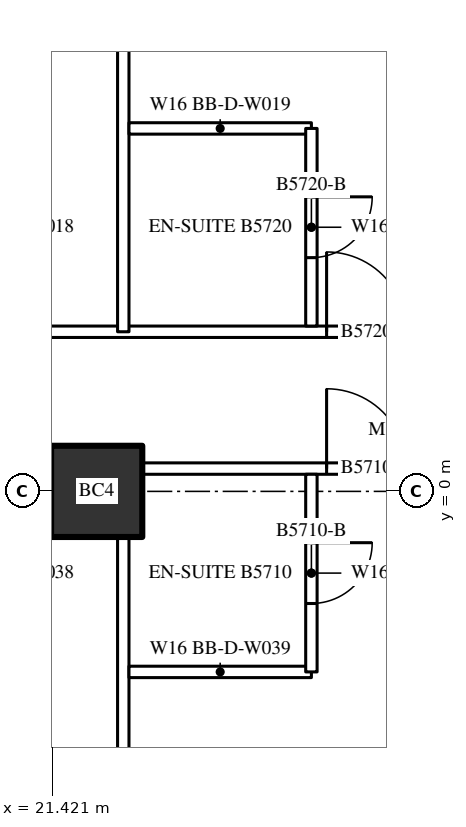
"""IFC4 building model, lengths in metres.
Left out: names, types, materials, properties, quantities, classifications, styles, units other than length and angle.
Written with IfcOpenShell. Run it as: python <this file> out.ifc"""

import sys

from ifc_helpers import new_model, si_unit, direction, frame, frame_2d, origin, origin_2d, place, context, subcontext, project, spatial, rectangle, hollow_rectangle, extrude, element, fill, save


model = new_model("IFC4")
c1 = context("Model", 3, precision=1e-05, world=origin(), true_north=direction((0.0, 1.0)))
c2 = subcontext(c1, "Body", "Model", "MODEL_VIEW")
j1 = project(units=[si_unit("LENGTHUNIT", "METRE"), si_unit("PLANEANGLEUNIT", "RADIAN")], contexts=[c1])
p1 = place(None, origin())
s1 = spatial("IfcSite", under=j1, at=p1, CompositionType="ELEMENT")
p2 = place(p1, origin())
s2 = spatial("IfcBuilding", under=s1, at=p2, CompositionType="ELEMENT")
p3 = place(p2, frame((0.0, 0.0, 215.3)))
s3 = spatial("IfcBuildingStorey", under=s2, at=p3, CompositionType="ELEMENT", Elevation=215.3)
p4 = place(p3, frame((22.0, 0.0, 0.0), z_axis=(0.0, 0.0, 1.0), x_axis=(1.0, 0.0, 0.0)))
e1 = element("IfcColumn", 1, at=p4, inside=s3, PredefinedType="COLUMN", context=c2, shape_type="SweptSolid", body=[
    extrude(hollow_rectangle(XDim=1.2, YDim=1.2, WallThickness=0.12, at=origin_2d()), origin(), (0.0, 0.0, 1.0), 3.6),
])
p5 = place(p3, frame((-27.5, 0.3, 0.0), z_axis=(0.0, 0.0, 1.0), x_axis=(1.0, 0.0, 0.0)))
e2 = element("IfcWall", 2, at=p5, inside=s3, PredefinedType="PARTITIONING", context=c2, shape_type="SweptSolid", body=[
    extrude(rectangle(XDim=55.0, YDim=0.15, at=frame_2d((27.5, 0.0))), origin(), (0.0, 0.0, 1.0), 2.4),
])
p6 = place(p5, frame((1.575, 0.0, 0.0)))
e3 = element("IfcOpeningElement", 3, at=p6, cuts=e2, PredefinedType="OPENING", context=c2, shape_type="SweptSolid", body=[
    extrude(rectangle(XDim=1.0, YDim=2.2, at=frame_2d((0.5, 1.1))), frame((0.0, 0.085, 0.0), z_axis=(0.0, -1.0, 0.0), x_axis=(1.0, 0.0, 0.0)), (0.0, 0.0, 1.0), 0.17),
])
p7 = place(p5, frame((8.525, 0.0, 0.0)))
e4 = element("IfcOpeningElement", 4, at=p7, cuts=e2, PredefinedType="OPENING", context=c2, shape_type="SweptSolid", body=[
    extrude(rectangle(XDim=1.05, YDim=2.4, at=frame_2d((0.525, 1.2))), frame((0.0, 0.085, 0.0), z_axis=(0.0, -1.0, 0.0), x_axis=(1.0, 0.0, 0.0)), (0.0, 0.0, 1.0), 0.17),
])
p8 = place(p5, frame((14.025, 0.0, 0.0)))
e5 = element("IfcOpeningElement", 5, at=p8, cuts=e2, PredefinedType="OPENING", context=c2, shape_type="SweptSolid", body=[
    extrude(rectangle(XDim=1.05, YDim=2.4, at=frame_2d((0.525, 1.2))), frame((0.0, 0.085, 0.0), z_axis=(0.0, -1.0, 0.0), x_axis=(1.0, 0.0, 0.0)), (0.0, 0.0, 1.0), 0.17),
])
p9 = place(p5, frame((19.525, 0.0, 0.0)))
e6 = element("IfcOpeningElement", 6, at=p9, cuts=e2, PredefinedType="OPENING", context=c2, shape_type="SweptSolid", body=[
    extrude(rectangle(XDim=1.05, YDim=2.4, at=frame_2d((0.525, 1.2))), frame((0.0, 0.085, 0.0), z_axis=(0.0, -1.0, 0.0), x_axis=(1.0, 0.0, 0.0)), (0.0, 0.0, 1.0), 0.17),
])
p10 = place(p5, frame((25.025, 0.0, 0.0)))
e7 = element("IfcOpeningElement", 7, at=p10, cuts=e2, PredefinedType="OPENING", context=c2, shape_type="SweptSolid", body=[
    extrude(rectangle(XDim=1.05, YDim=2.4, at=frame_2d((0.525, 1.2))), frame((0.0, 0.085, 0.0), z_axis=(0.0, -1.0, 0.0), x_axis=(1.0, 0.0, 0.0)), (0.0, 0.0, 1.0), 0.17),
])
p11 = place(p5, frame((30.525, 0.0, 0.0)))
e8 = element("IfcOpeningElement", 8, at=p11, cuts=e2, PredefinedType="OPENING", context=c2, shape_type="SweptSolid", body=[
    extrude(rectangle(XDim=1.05, YDim=2.4, at=frame_2d((0.525, 1.2))), frame((0.0, 0.085, 0.0), z_axis=(0.0, -1.0, 0.0), x_axis=(1.0, 0.0, 0.0)), (0.0, 0.0, 1.0), 0.17),
])
p12 = place(p5, frame((36.025, 0.0, 0.0)))
e9 = element("IfcOpeningElement", 9, at=p12, cuts=e2, PredefinedType="OPENING", context=c2, shape_type="SweptSolid", body=[
    extrude(rectangle(XDim=1.05, YDim=2.4, at=frame_2d((0.525, 1.2))), frame((0.0, 0.085, 0.0), z_axis=(0.0, -1.0, 0.0), x_axis=(1.0, 0.0, 0.0)), (0.0, 0.0, 1.0), 0.17),
])
p13 = place(p5, frame((41.525, 0.0, 0.0)))
e10 = element("IfcOpeningElement", 10, at=p13, cuts=e2, PredefinedType="OPENING", context=c2, shape_type="SweptSolid", body=[
    extrude(rectangle(XDim=1.05, YDim=2.4, at=frame_2d((0.525, 1.2))), frame((0.0, 0.085, 0.0), z_axis=(0.0, -1.0, 0.0), x_axis=(1.0, 0.0, 0.0)), (0.0, 0.0, 1.0), 0.17),
])
p14 = place(p5, frame((47.025, 0.0, 0.0)))
e11 = element("IfcOpeningElement", 11, at=p14, cuts=e2, PredefinedType="OPENING", context=c2, shape_type="SweptSolid", body=[
    extrude(rectangle(XDim=1.05, YDim=2.4, at=frame_2d((0.525, 1.2))), frame((0.0, 0.085, 0.0), z_axis=(0.0, -1.0, 0.0), x_axis=(1.0, 0.0, 0.0)), (0.0, 0.0, 1.0), 0.17),
])
p15 = place(p5, frame((52.525, 0.0, 0.0)))
e12 = element("IfcOpeningElement", 12, at=p15, cuts=e2, PredefinedType="OPENING", context=c2, shape_type="SweptSolid", body=[
    extrude(rectangle(XDim=1.05, YDim=2.4, at=frame_2d((0.525, 1.2))), frame((0.0, 0.085, 0.0), z_axis=(0.0, -1.0, 0.0), x_axis=(1.0, 0.0, 0.0)), (0.0, 0.0, 1.0), 0.17),
])
p16 = place(p3, frame((-27.5, 2.1, 0.0), z_axis=(0.0, 0.0, 1.0), x_axis=(1.0, 0.0, 0.0)))
e13 = element("IfcWall", 13, at=p16, inside=s3, PredefinedType="PARTITIONING", context=c2, shape_type="SweptSolid", body=[
    extrude(rectangle(XDim=55.0, YDim=0.15, at=frame_2d((27.5, 0.0))), origin(), (0.0, 0.0, 1.0), 3.4),
])
p17 = place(p16, frame((2.025, 0.0, 0.0)))
e14 = element("IfcOpeningElement", 14, at=p17, cuts=e13, PredefinedType="OPENING", context=c2, shape_type="SweptSolid", body=[
    extrude(rectangle(XDim=1.05, YDim=2.4, at=frame_2d((0.525, 1.2))), frame((0.0, 0.085, 0.0), z_axis=(0.0, -1.0, 0.0), x_axis=(1.0, 0.0, 0.0)), (0.0, 0.0, 1.0), 0.17),
])
p18 = place(p16, frame((8.525, 0.0, 0.0)))
e15 = element("IfcOpeningElement", 15, at=p18, cuts=e13, PredefinedType="OPENING", context=c2, shape_type="SweptSolid", body=[
    extrude(rectangle(XDim=1.05, YDim=2.4, at=frame_2d((0.525, 1.2))), frame((0.0, 0.085, 0.0), z_axis=(0.0, -1.0, 0.0), x_axis=(1.0, 0.0, 0.0)), (0.0, 0.0, 1.0), 0.17),
])
p19 = place(p16, frame((14.025, 0.0, 0.0)))
e16 = element("IfcOpeningElement", 16, at=p19, cuts=e13, PredefinedType="OPENING", context=c2, shape_type="SweptSolid", body=[
    extrude(rectangle(XDim=1.05, YDim=2.4, at=frame_2d((0.525, 1.2))), frame((0.0, 0.085, 0.0), z_axis=(0.0, -1.0, 0.0), x_axis=(1.0, 0.0, 0.0)), (0.0, 0.0, 1.0), 0.17),
])
p20 = place(p16, frame((19.525, 0.0, 0.0)))
e17 = element("IfcOpeningElement", 17, at=p20, cuts=e13, PredefinedType="OPENING", context=c2, shape_type="SweptSolid", body=[
    extrude(rectangle(XDim=1.05, YDim=2.4, at=frame_2d((0.525, 1.2))), frame((0.0, 0.085, 0.0), z_axis=(0.0, -1.0, 0.0), x_axis=(1.0, 0.0, 0.0)), (0.0, 0.0, 1.0), 0.17),
])
p21 = place(p16, frame((25.025, 0.0, 0.0)))
e18 = element("IfcOpeningElement", 18, at=p21, cuts=e13, PredefinedType="OPENING", context=c2, shape_type="SweptSolid", body=[
    extrude(rectangle(XDim=1.05, YDim=2.4, at=frame_2d((0.525, 1.2))), frame((0.0, 0.085, 0.0), z_axis=(0.0, -1.0, 0.0), x_axis=(1.0, 0.0, 0.0)), (0.0, 0.0, 1.0), 0.17),
])
p22 = place(p16, frame((30.525, 0.0, 0.0)))
e19 = element("IfcOpeningElement", 19, at=p22, cuts=e13, PredefinedType="OPENING", context=c2, shape_type="SweptSolid", body=[
    extrude(rectangle(XDim=1.05, YDim=2.4, at=frame_2d((0.525, 1.2))), frame((0.0, 0.085, 0.0), z_axis=(0.0, -1.0, 0.0), x_axis=(1.0, 0.0, 0.0)), (0.0, 0.0, 1.0), 0.17),
])
p23 = place(p16, frame((36.025, 0.0, 0.0)))
e20 = element("IfcOpeningElement", 20, at=p23, cuts=e13, PredefinedType="OPENING", context=c2, shape_type="SweptSolid", body=[
    extrude(rectangle(XDim=1.05, YDim=2.4, at=frame_2d((0.525, 1.2))), frame((0.0, 0.085, 0.0), z_axis=(0.0, -1.0, 0.0), x_axis=(1.0, 0.0, 0.0)), (0.0, 0.0, 1.0), 0.17),
])
p24 = place(p16, frame((41.525, 0.0, 0.0)))
e21 = element("IfcOpeningElement", 21, at=p24, cuts=e13, PredefinedType="OPENING", context=c2, shape_type="SweptSolid", body=[
    extrude(rectangle(XDim=1.05, YDim=2.4, at=frame_2d((0.525, 1.2))), frame((0.0, 0.085, 0.0), z_axis=(0.0, -1.0, 0.0), x_axis=(1.0, 0.0, 0.0)), (0.0, 0.0, 1.0), 0.17),
])
p25 = place(p16, frame((47.025, 0.0, 0.0)))
e22 = element("IfcOpeningElement", 22, at=p25, cuts=e13, PredefinedType="OPENING", context=c2, shape_type="SweptSolid", body=[
    extrude(rectangle(XDim=1.05, YDim=2.4, at=frame_2d((0.525, 1.2))), frame((0.0, 0.085, 0.0), z_axis=(0.0, -1.0, 0.0), x_axis=(1.0, 0.0, 0.0)), (0.0, 0.0, 1.0), 0.17),
])
p26 = place(p16, frame((52.525, 0.0, 0.0)))
e23 = element("IfcOpeningElement", 23, at=p26, cuts=e13, PredefinedType="OPENING", context=c2, shape_type="SweptSolid", body=[
    extrude(rectangle(XDim=1.05, YDim=2.4, at=frame_2d((0.525, 1.2))), frame((0.0, 0.085, 0.0), z_axis=(0.0, -1.0, 0.0), x_axis=(1.0, 0.0, 0.0)), (0.0, 0.0, 1.0), 0.17),
])
p27 = place(p3, frame((22.35, -12.07, 0.0), z_axis=(0.0, 0.0, 1.0), x_axis=(0.0, 1.0, 0.0)))
e24 = element("IfcWall", 24, at=p27, inside=s3, PredefinedType="PARTITIONING", context=c2, shape_type="SweptSolid", body=[
    extrude(rectangle(XDim=12.37, YDim=0.15, at=frame_2d((6.185, 0.0))), origin(), (0.0, 0.0, 1.0), 3.4),
])
p28 = place(p3, frame((22.425, -2.375, 0.0), z_axis=(0.0, 0.0, 1.0), x_axis=(1.0, 0.0, 0.0)))
e25 = element("IfcWall", 25, at=p28, inside=s3, PredefinedType="PARTITIONING", context=c2, shape_type="SweptSolid", body=[
    extrude(rectangle(XDim=2.4, YDim=0.15, at=frame_2d((1.2, 0.0))), origin(), (0.0, 0.0, 1.0), 3.4),
])
p29 = place(p3, frame((24.825, -2.375, 0.0), z_axis=(0.0, 0.0, 1.0), x_axis=(0.0, 1.0, 0.0)))
e26 = element("IfcWall", 26, at=p29, inside=s3, PredefinedType="PARTITIONING", context=c2, shape_type="SweptSolid", body=[
    extrude(rectangle(XDim=2.6, YDim=0.15, at=frame_2d((1.3, 0.0))), origin(), (0.0, 0.0, 1.0), 3.4),
])
p30 = place(p29, frame((0.9, 0.0, 0.0)))
e27 = element("IfcOpeningElement", 27, at=p30, cuts=e26, PredefinedType="OPENING", context=c2, shape_type="SweptSolid", body=[
    extrude(rectangle(XDim=0.8, YDim=2.2, at=frame_2d((0.4, 1.1))), frame((0.0, 0.085, 0.0), z_axis=(0.0, -1.0, 0.0), x_axis=(1.0, 0.0, 0.0)), (0.0, 0.0, 1.0), 0.17),
])
p31 = place(p3, frame((22.35, 2.1, 0.0), z_axis=(0.0, 0.0, 1.0), x_axis=(0.0, 1.0, 0.0)))
e28 = element("IfcWall", 28, at=p31, inside=s3, PredefinedType="PARTITIONING", context=c2, shape_type="SweptSolid", body=[
    extrude(rectangle(XDim=9.97, YDim=0.15, at=frame_2d((4.985, 0.0))), origin(), (0.0, 0.0, 1.0), 3.4),
])
p32 = place(p3, frame((22.425, 4.775, 0.0), z_axis=(0.0, 0.0, 1.0), x_axis=(1.0, 0.0, 0.0)))
e29 = element("IfcWall", 29, at=p32, inside=s3, PredefinedType="PARTITIONING", context=c2, shape_type="SweptSolid", body=[
    extrude(rectangle(XDim=2.4, YDim=0.15, at=frame_2d((1.2, 0.0))), origin(), (0.0, 0.0, 1.0), 3.4),
])
p33 = place(p3, frame((24.825, 2.175, 0.0), z_axis=(0.0, 0.0, 1.0), x_axis=(0.0, 1.0, 0.0)))
e30 = element("IfcWall", 30, at=p33, inside=s3, PredefinedType="PARTITIONING", context=c2, shape_type="SweptSolid", body=[
    extrude(rectangle(XDim=2.6, YDim=0.15, at=frame_2d((1.3, 0.0))), origin(), (0.0, 0.0, 1.0), 3.4),
])
p34 = place(p33, frame((0.9, 0.0, 0.0)))
e31 = element("IfcOpeningElement", 31, at=p34, cuts=e30, PredefinedType="OPENING", context=c2, shape_type="SweptSolid", body=[
    extrude(rectangle(XDim=0.8, YDim=2.2, at=frame_2d((0.4, 1.1))), frame((0.0, 0.085, 0.0), z_axis=(0.0, -1.0, 0.0), x_axis=(1.0, 0.0, 0.0)), (0.0, 0.0, 1.0), 0.17),
])
p35 = place(p30, origin())
e32 = element("IfcDoor", 32, at=p35, inside=s3, OperationType="SINGLE_SWING_RIGHT", PredefinedType="DOOR", context=c2, shape_type="SweptSolid", body=[
    extrude(rectangle(XDim=0.8, YDim=2.2, at=frame_2d((0.4, 1.1))), frame((0.0, 0.025, 0.0), z_axis=(0.0, -1.0, 0.0), x_axis=(1.0, 0.0, 0.0)), (0.0, 0.0, 1.0), 0.05),
])
fill(e27, e32)
p36 = place(p15, origin())
e33 = element("IfcDoor", 33, at=p36, inside=s3, OperationType="SINGLE_SWING_LEFT", PredefinedType="DOOR", context=c2, shape_type="SweptSolid", body=[
    extrude(rectangle(XDim=1.05, YDim=2.4, at=frame_2d((0.525, 1.2))), frame((0.0, 0.025, 0.0), z_axis=(0.0, -1.0, 0.0), x_axis=(1.0, 0.0, 0.0)), (0.0, 0.0, 1.0), 0.05),
])
fill(e12, e33)
p37 = place(p34, origin())
e34 = element("IfcDoor", 34, at=p37, inside=s3, OperationType="SINGLE_SWING_RIGHT", PredefinedType="DOOR", context=c2, shape_type="SweptSolid", body=[
    extrude(rectangle(XDim=0.8, YDim=2.2, at=frame_2d((0.4, 1.1))), frame((0.0, 0.025, 0.0), z_axis=(0.0, -1.0, 0.0), x_axis=(1.0, 0.0, 0.0)), (0.0, 0.0, 1.0), 0.05),
])
fill(e31, e34)
p38 = place(p26, origin())
e35 = element("IfcDoor", 35, at=p38, inside=s3, OperationType="SINGLE_SWING_LEFT", PredefinedType="DOOR", context=c2, shape_type="SweptSolid", body=[
    extrude(rectangle(XDim=1.05, YDim=2.4, at=frame_2d((0.525, 1.2))), frame((0.0, 0.025, 0.0), z_axis=(0.0, -1.0, 0.0), x_axis=(1.0, 0.0, 0.0)), (0.0, 0.0, 1.0), 0.05),
])
fill(e23, e35)
save(model, sys.argv[1])
